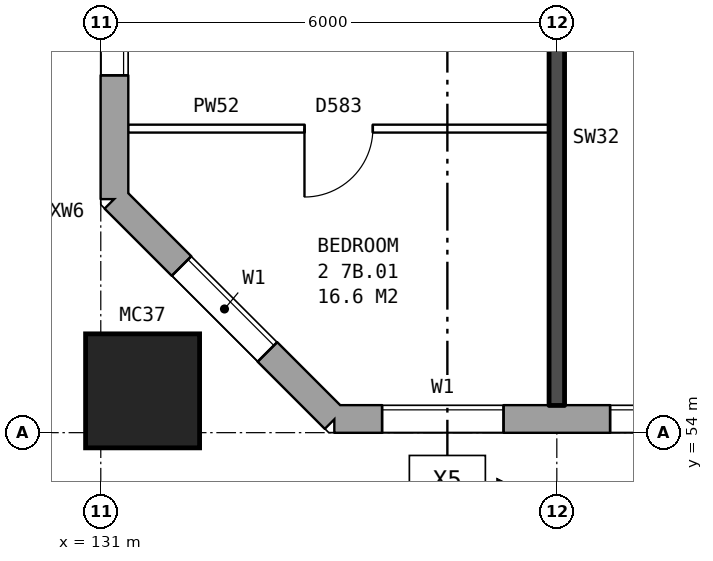
"""IFC4 building model, lengths in metres.
Left out: names, types, materials, properties, quantities, classifications, styles, units other than length and angle.
Written with IfcOpenShell. Run it as: python <this file> out.ifc"""

import sys

from ifc_helpers import new_model, si_unit, direction, frame, frame_2d, origin, origin_2d, place, context, subcontext, project, spatial, rectangle, hollow_rectangle, extrude, element, fill, save


model = new_model("IFC4")
c1 = context("Model", 3, precision=1e-05, world=origin(), true_north=direction((0.0, 1.0)))
c2 = subcontext(c1, "Body", "Model", "MODEL_VIEW")
j1 = project(units=[si_unit("LENGTHUNIT", "METRE"), si_unit("PLANEANGLEUNIT", "RADIAN")], contexts=[c1])
p1 = place(None, origin())
s1 = spatial("IfcSite", under=j1, at=p1, CompositionType="ELEMENT")
p2 = place(p1, origin())
s2 = spatial("IfcBuilding", under=s1, at=p2, CompositionType="ELEMENT")
p3 = place(p2, frame((0.0, 0.0, 28.8)))
s3 = spatial("IfcBuildingStorey", under=s2, at=p3, CompositionType="ELEMENT", Elevation=28.8)
p4 = place(p3, frame((131.55, 54.55, 0.0), z_axis=(0.0, 0.0, 1.0), x_axis=(1.0, 0.0, 0.0)))
e1 = element("IfcColumn", 1, at=p4, inside=s3, PredefinedType="COLUMN", context=c2, shape_type="SweptSolid", body=[
    extrude(hollow_rectangle(XDim=1.5, YDim=1.5, WallThickness=0.08, at=origin_2d()), origin(), (0.0, 0.0, 1.0), 3.1),
])
p5 = place(p3, frame((131.18, 57.075, 0.0), z_axis=(0.0, 0.0, 1.0), x_axis=(0.707106781187, -0.707106781187, 0.0)))
e2 = element("IfcWall", 2, at=p5, inside=s3, PredefinedType="STANDARD", context=c2, shape_type="SweptSolid", body=[
    extrude(rectangle(XDim=4.094, YDim=0.36, at=frame_2d((2.047, 0.0))), origin(), (0.0, 0.0, 1.0), 2.85),
])
p6 = place(p5, frame((1.247, 0.0, 0.8)))
e3 = element("IfcOpeningElement", 3, at=p6, cuts=e2, PredefinedType="OPENING", context=c2, shape_type="SweptSolid", body=[
    extrude(rectangle(XDim=1.6, YDim=1.8, at=frame_2d((0.8, 0.9))), frame((0.0, 0.19, 0.0), z_axis=(0.0, -1.0, 0.0), x_axis=(1.0, 0.0, 0.0)), (0.0, 0.0, 1.0), 0.38),
])
p7 = place(p3, frame((134.075, 54.18, 0.0), z_axis=(0.0, 0.0, 1.0), x_axis=(1.0, 0.0, 0.0)))
e4 = element("IfcWall", 4, at=p7, inside=s3, PredefinedType="STANDARD", context=c2, shape_type="SweptSolid", body=[
    extrude(rectangle(XDim=40.601, YDim=0.36, at=frame_2d((20.3, 0.0))), origin(), (0.0, 0.0, 1.0), 2.85),
])
p8 = place(p7, frame((0.625, 0.0, 0.8)))
e5 = element("IfcOpeningElement", 5, at=p8, cuts=e4, PredefinedType="OPENING", context=c2, shape_type="SweptSolid", body=[
    extrude(rectangle(XDim=1.6, YDim=1.8, at=frame_2d((0.8, 0.9))), frame((0.0, 0.19, 0.0), z_axis=(0.0, -1.0, 0.0), x_axis=(1.0, 0.0, 0.0)), (0.0, 0.0, 1.0), 0.38),
])
p9 = place(p7, frame((3.625, 0.0, 0.8)))
e6 = element("IfcOpeningElement", 6, at=p9, cuts=e4, PredefinedType="OPENING", context=c2, shape_type="SweptSolid", body=[
    extrude(rectangle(XDim=1.6, YDim=1.8, at=frame_2d((0.8, 0.9))), frame((0.0, 0.19, 0.0), z_axis=(0.0, -1.0, 0.0), x_axis=(1.0, 0.0, 0.0)), (0.0, 0.0, 1.0), 0.38),
])
p10 = place(p7, frame((6.625, 0.0, 0.8)))
e7 = element("IfcOpeningElement", 7, at=p10, cuts=e4, PredefinedType="OPENING", context=c2, shape_type="SweptSolid", body=[
    extrude(rectangle(XDim=1.6, YDim=1.8, at=frame_2d((0.8, 0.9))), frame((0.0, 0.19, 0.0), z_axis=(0.0, -1.0, 0.0), x_axis=(1.0, 0.0, 0.0)), (0.0, 0.0, 1.0), 0.38),
])
p11 = place(p7, frame((9.125, 0.0, 1.65)))
e8 = element("IfcOpeningElement", 8, at=p11, cuts=e4, PredefinedType="OPENING", context=c2, shape_type="SweptSolid", body=[
    extrude(rectangle(XDim=1.4, YDim=0.9, at=frame_2d((0.7, 0.45))), frame((0.0, 0.19, 0.0), z_axis=(0.0, -1.0, 0.0), x_axis=(1.0, 0.0, 0.0)), (0.0, 0.0, 1.0), 0.38),
])
p12 = place(p7, frame((12.075, 0.0, 0.8)))
e9 = element("IfcOpeningElement", 9, at=p12, cuts=e4, PredefinedType="OPENING", context=c2, shape_type="SweptSolid", body=[
    extrude(rectangle(XDim=0.6, YDim=0.9, at=frame_2d((0.3, 0.45))), frame((0.0, 0.19, 0.0), z_axis=(0.0, -1.0, 0.0), x_axis=(1.0, 0.0, 0.0)), (0.0, 0.0, 1.0), 0.38),
])
p13 = place(p7, frame((15.625, 0.0, 0.8)))
e10 = element("IfcOpeningElement", 10, at=p13, cuts=e4, PredefinedType="OPENING", context=c2, shape_type="SweptSolid", body=[
    extrude(rectangle(XDim=1.6, YDim=1.8, at=frame_2d((0.8, 0.9))), frame((0.0, 0.19, 0.0), z_axis=(0.0, -1.0, 0.0), x_axis=(1.0, 0.0, 0.0)), (0.0, 0.0, 1.0), 0.38),
])
p14 = place(p7, frame((18.625, 0.0, 0.8)))
e11 = element("IfcOpeningElement", 11, at=p14, cuts=e4, PredefinedType="OPENING", context=c2, shape_type="SweptSolid", body=[
    extrude(rectangle(XDim=1.6, YDim=1.8, at=frame_2d((0.8, 0.9))), frame((0.0, 0.19, 0.0), z_axis=(0.0, -1.0, 0.0), x_axis=(1.0, 0.0, 0.0)), (0.0, 0.0, 1.0), 0.38),
])
p15 = place(p7, frame((21.625, 0.0, 0.8)))
e12 = element("IfcOpeningElement", 12, at=p15, cuts=e4, PredefinedType="OPENING", context=c2, shape_type="SweptSolid", body=[
    extrude(rectangle(XDim=1.6, YDim=1.8, at=frame_2d((0.8, 0.9))), frame((0.0, 0.19, 0.0), z_axis=(0.0, -1.0, 0.0), x_axis=(1.0, 0.0, 0.0)), (0.0, 0.0, 1.0), 0.38),
])
p16 = place(p7, frame((24.625, 0.0, 0.8)))
e13 = element("IfcOpeningElement", 13, at=p16, cuts=e4, PredefinedType="OPENING", context=c2, shape_type="SweptSolid", body=[
    extrude(rectangle(XDim=1.6, YDim=1.8, at=frame_2d((0.8, 0.9))), frame((0.0, 0.19, 0.0), z_axis=(0.0, -1.0, 0.0), x_axis=(1.0, 0.0, 0.0)), (0.0, 0.0, 1.0), 0.38),
])
p17 = place(p7, frame((27.125, 0.0, 0.65)))
e14 = element("IfcOpeningElement", 14, at=p17, cuts=e4, PredefinedType="OPENING", context=c2, shape_type="SweptSolid", body=[
    extrude(rectangle(XDim=0.6, YDim=1.8, at=frame_2d((0.3, 0.9))), frame((0.0, 0.19, 0.0), z_axis=(0.0, -1.0, 0.0), x_axis=(1.0, 0.0, 0.0)), (0.0, 0.0, 1.0), 0.38),
])
p18 = place(p7, frame((30.125, 0.0, 1.6)))
e15 = element("IfcOpeningElement", 15, at=p18, cuts=e4, PredefinedType="OPENING", context=c2, shape_type="SweptSolid", body=[
    extrude(rectangle(XDim=0.6, YDim=0.9, at=frame_2d((0.3, 0.45))), frame((0.0, 0.19, 0.0), z_axis=(0.0, -1.0, 0.0), x_axis=(1.0, 0.0, 0.0)), (0.0, 0.0, 1.0), 0.38),
])
p19 = place(p7, frame((33.625, 0.0, 0.8)))
e16 = element("IfcOpeningElement", 16, at=p19, cuts=e4, PredefinedType="OPENING", context=c2, shape_type="SweptSolid", body=[
    extrude(rectangle(XDim=1.6, YDim=1.8, at=frame_2d((0.8, 0.9))), frame((0.0, 0.19, 0.0), z_axis=(0.0, -1.0, 0.0), x_axis=(1.0, 0.0, 0.0)), (0.0, 0.0, 1.0), 0.38),
])
p20 = place(p7, frame((36.625, 0.0, 0.8)))
e17 = element("IfcOpeningElement", 17, at=p20, cuts=e4, PredefinedType="OPENING", context=c2, shape_type="SweptSolid", body=[
    extrude(rectangle(XDim=1.6, YDim=1.8, at=frame_2d((0.8, 0.9))), frame((0.0, 0.19, 0.0), z_axis=(0.0, -1.0, 0.0), x_axis=(1.0, 0.0, 0.0)), (0.0, 0.0, 1.0), 0.38),
])
p21 = place(p7, frame((11.075, 0.0, 0.15)))
e18 = element("IfcOpeningElement", 18, at=p21, cuts=e4, PredefinedType="OPENING", context=c2, shape_type="SweptSolid", body=[
    extrude(rectangle(XDim=0.6, YDim=0.9, at=frame_2d((0.3, 0.45))), frame((0.0, 0.19, 0.0), z_axis=(0.0, -1.0, 0.0), x_axis=(1.0, 0.0, 0.0)), (0.0, 0.0, 1.0), 0.38),
])
p22 = place(p7, frame((13.025, 0.0, 0.8)))
e19 = element("IfcOpeningElement", 19, at=p22, cuts=e4, PredefinedType="OPENING", context=c2, shape_type="SweptSolid", body=[
    extrude(rectangle(XDim=1.6, YDim=1.8, at=frame_2d((0.8, 0.9))), frame((0.0, 0.19, 0.0), z_axis=(0.0, -1.0, 0.0), x_axis=(1.0, 0.0, 0.0)), (0.0, 0.0, 1.0), 0.38),
])
p23 = place(p7, frame((28.025, 0.0, 0.65)))
e20 = element("IfcOpeningElement", 20, at=p23, cuts=e4, PredefinedType="OPENING", context=c2, shape_type="SweptSolid", body=[
    extrude(rectangle(XDim=0.8, YDim=0.9, at=frame_2d((0.4, 0.45))), frame((0.0, 0.19, 0.0), z_axis=(0.0, -1.0, 0.0), x_axis=(1.0, 0.0, 0.0)), (0.0, 0.0, 1.0), 0.38),
])
p24 = place(p7, frame((31.075, 0.0, 0.8)))
e21 = element("IfcOpeningElement", 21, at=p24, cuts=e4, PredefinedType="OPENING", context=c2, shape_type="SweptSolid", body=[
    extrude(rectangle(XDim=1.6, YDim=1.8, at=frame_2d((0.8, 0.9))), frame((0.0, 0.19, 0.0), z_axis=(0.0, -1.0, 0.0), x_axis=(1.0, 0.0, 0.0)), (0.0, 0.0, 1.0), 0.38),
])
p25 = place(p3, frame((131.18, 82.925, 0.0), z_axis=(0.0, 0.0, 1.0), x_axis=(0.0, -1.0, 0.0)))
e22 = element("IfcWall", 22, at=p25, inside=s3, PredefinedType="STANDARD", context=c2, shape_type="SweptSolid", body=[
    extrude(rectangle(XDim=25.851, YDim=0.36, at=frame_2d((12.925, 0.0))), origin(), (0.0, 0.0, 1.0), 2.85),
])
p26 = place(p25, frame((1.625, 0.0, 0.8)))
e23 = element("IfcOpeningElement", 23, at=p26, cuts=e22, PredefinedType="OPENING", context=c2, shape_type="SweptSolid", body=[
    extrude(rectangle(XDim=1.6, YDim=1.8, at=frame_2d((0.8, 0.9))), frame((0.0, 0.19, 0.0), z_axis=(0.0, -1.0, 0.0), x_axis=(1.0, 0.0, 0.0)), (0.0, 0.0, 1.0), 0.38),
])
p27 = place(p25, frame((4.625, 0.0, 0.8)))
e24 = element("IfcOpeningElement", 24, at=p27, cuts=e22, PredefinedType="OPENING", context=c2, shape_type="SweptSolid", body=[
    extrude(rectangle(XDim=1.6, YDim=1.8, at=frame_2d((0.8, 0.9))), frame((0.0, 0.19, 0.0), z_axis=(0.0, -1.0, 0.0), x_axis=(1.0, 0.0, 0.0)), (0.0, 0.0, 1.0), 0.38),
])
p28 = place(p25, frame((19.625, 0.0, 0.8)))
e25 = element("IfcOpeningElement", 25, at=p28, cuts=e22, PredefinedType="OPENING", context=c2, shape_type="SweptSolid", body=[
    extrude(rectangle(XDim=1.6, YDim=1.8, at=frame_2d((0.8, 0.9))), frame((0.0, 0.19, 0.0), z_axis=(0.0, -1.0, 0.0), x_axis=(1.0, 0.0, 0.0)), (0.0, 0.0, 1.0), 0.38),
])
p29 = place(p25, frame((22.625, 0.0, 0.8)))
e26 = element("IfcOpeningElement", 26, at=p29, cuts=e22, PredefinedType="OPENING", context=c2, shape_type="SweptSolid", body=[
    extrude(rectangle(XDim=1.6, YDim=1.8, at=frame_2d((0.8, 0.9))), frame((0.0, 0.19, 0.0), z_axis=(0.0, -1.0, 0.0), x_axis=(1.0, 0.0, 0.0)), (0.0, 0.0, 1.0), 0.38),
])
p30 = place(p3, frame((131.36, 58.0, 0.0), z_axis=(0.0, 0.0, 1.0), x_axis=(1.0, 0.0, 0.0)))
e27 = element("IfcWall", 27, at=p30, inside=s3, PredefinedType="PARTITIONING", context=c2, shape_type="SweptSolid", body=[
    extrude(rectangle(XDim=5.54, YDim=0.1, at=frame_2d((2.77, 0.0))), origin(), (0.0, 0.0, 1.0), 2.85),
])
p31 = place(p30, frame((2.32, 0.0, 0.0)))
e28 = element("IfcOpeningElement", 28, at=p31, cuts=e27, PredefinedType="OPENING", context=c2, shape_type="SweptSolid", body=[
    extrude(rectangle(XDim=0.9, YDim=2.1, at=frame_2d((0.45, 1.05))), frame((0.0, 0.06, 0.0), z_axis=(0.0, -1.0, 0.0), x_axis=(1.0, 0.0, 0.0)), (0.0, 0.0, 1.0), 0.12),
])
p32 = place(p3, frame((137.0, 54.36, 0.0), z_axis=(0.0, 0.0, 1.0), x_axis=(0.0, 1.0, 0.0)))
e29 = element("IfcWall", 29, at=p32, inside=s3, PredefinedType="SOLIDWALL", context=c2, shape_type="SweptSolid", body=[
    extrude(rectangle(XDim=9.44, YDim=0.2, at=frame_2d((4.72, 0.0))), origin(), (0.0, 0.0, 1.0), 2.85),
])
p33 = place(p32, frame((7.04, 0.0, 0.0)))
e30 = element("IfcOpeningElement", 30, at=p33, cuts=e29, PredefinedType="OPENING", context=c2, shape_type="SweptSolid", body=[
    extrude(rectangle(XDim=0.9, YDim=2.1, at=frame_2d((0.45, 1.05))), frame((0.0, 0.11, 0.0), z_axis=(0.0, -1.0, 0.0), x_axis=(1.0, 0.0, 0.0)), (0.0, 0.0, 1.0), 0.22),
])
p34 = place(p6, origin())
e31 = element("IfcWindow", 31, at=p34, inside=s3, PartitioningType="SINGLE_PANEL", PredefinedType="WINDOW", context=c2, shape_type="SweptSolid", body=[
    extrude(rectangle(XDim=1.6, YDim=1.8, at=frame_2d((0.8, 0.9))), frame((0.0, 0.15, 0.0), z_axis=(0.0, -1.0, 0.0), x_axis=(1.0, 0.0, 0.0)), (0.0, 0.0, 1.0), 0.06),
])
fill(e3, e31)
p35 = place(p8, origin())
e32 = element("IfcWindow", 32, at=p35, inside=s3, PartitioningType="SINGLE_PANEL", PredefinedType="WINDOW", context=c2, shape_type="SweptSolid", body=[
    extrude(rectangle(XDim=1.6, YDim=1.8, at=frame_2d((0.8, 0.9))), frame((0.0, 0.15, 0.0), z_axis=(0.0, -1.0, 0.0), x_axis=(1.0, 0.0, 0.0)), (0.0, 0.0, 1.0), 0.06),
])
fill(e5, e32)
p36 = place(p9, origin())
e33 = element("IfcWindow", 33, at=p36, inside=s3, PartitioningType="SINGLE_PANEL", PredefinedType="WINDOW", context=c2, shape_type="SweptSolid", body=[
    extrude(rectangle(XDim=1.6, YDim=1.8, at=frame_2d((0.8, 0.9))), frame((0.0, 0.15, 0.0), z_axis=(0.0, -1.0, 0.0), x_axis=(1.0, 0.0, 0.0)), (0.0, 0.0, 1.0), 0.06),
])
fill(e6, e33)
p37 = place(p29, origin())
e34 = element("IfcWindow", 34, at=p37, inside=s3, PartitioningType="SINGLE_PANEL", PredefinedType="WINDOW", context=c2, shape_type="SweptSolid", body=[
    extrude(rectangle(XDim=1.6, YDim=1.8, at=frame_2d((0.8, 0.9))), frame((0.0, 0.15, 0.0), z_axis=(0.0, -1.0, 0.0), x_axis=(1.0, 0.0, 0.0)), (0.0, 0.0, 1.0), 0.06),
])
fill(e26, e34)
p38 = place(p31, frame((0.9, 0.0, 0.0), z_axis=(0.0, 0.0, 1.0), x_axis=(-1.0, 0.0, 0.0)))
e35 = element("IfcDoor", 35, at=p38, inside=s3, OperationType="SINGLE_SWING_RIGHT", PredefinedType="DOOR", context=c2, shape_type="SweptSolid", body=[
    extrude(rectangle(XDim=0.9, YDim=2.1, at=frame_2d((0.45, 1.05))), frame((0.0, 0.025, 0.0), z_axis=(0.0, -1.0, 0.0), x_axis=(1.0, 0.0, 0.0)), (0.0, 0.0, 1.0), 0.05),
])
fill(e28, e35)
save(model, sys.argv[1])
